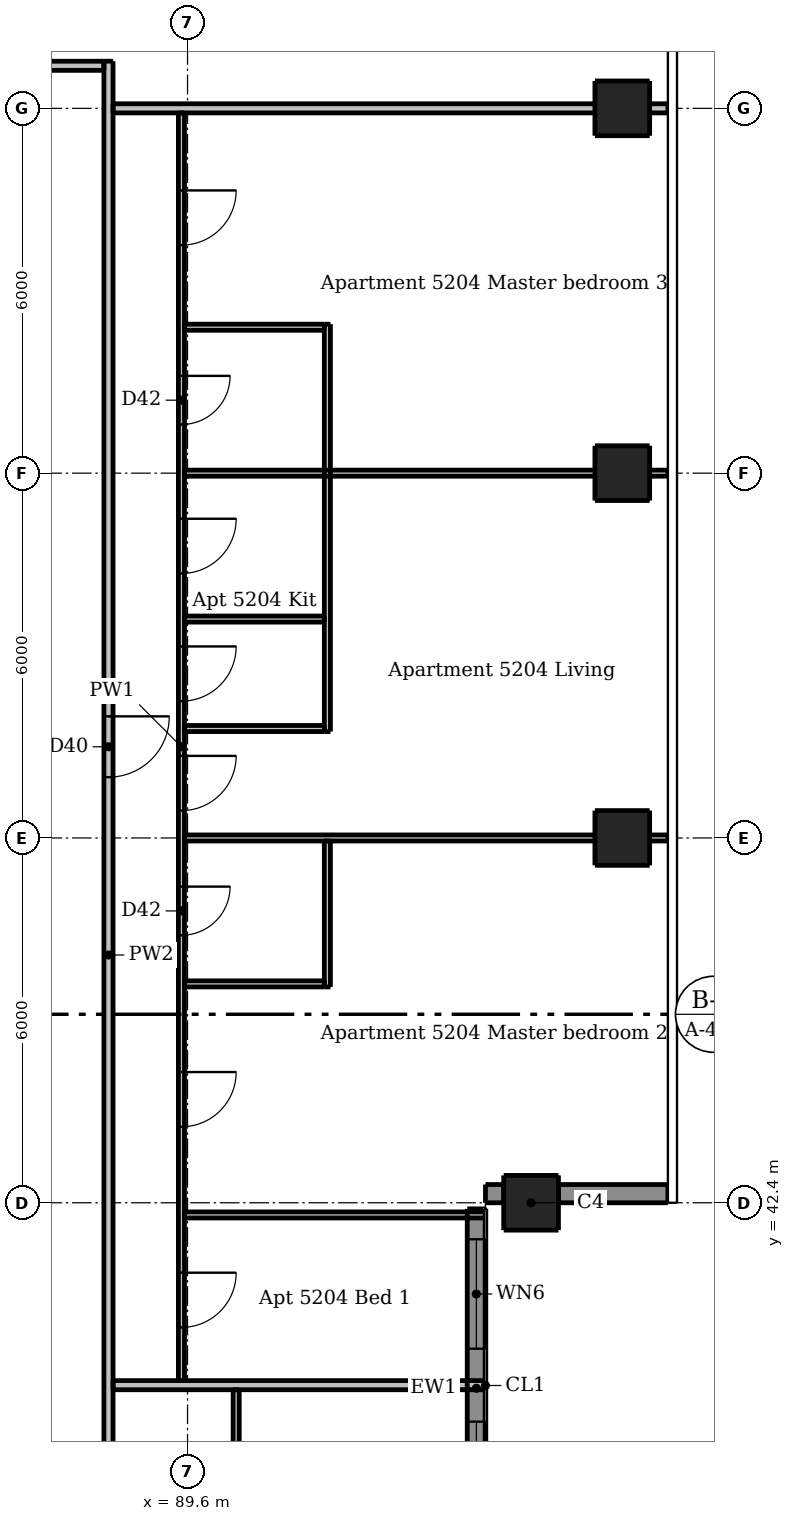
"""IFC4 building model, lengths in metres.
Left out: names, types, materials, properties, quantities, classifications, styles, units other than length and angle.
Written with IfcOpenShell. Run it as: python <this file> out.ifc"""

import sys

from ifc_helpers import new_model, si_unit, direction, frame, frame_2d, origin, origin_2d, place, context, subcontext, project, spatial, rectangle, extrude, element, fill, save


model = new_model("IFC4")
c1 = context("Model", 3, precision=1e-05, world=origin(), true_north=direction((0.0, 1.0)))
c2 = subcontext(c1, "Body", "Model", "MODEL_VIEW")
j1 = project(units=[si_unit("LENGTHUNIT", "METRE"), si_unit("PLANEANGLEUNIT", "RADIAN")], contexts=[c1])
p1 = place(None, origin())
s1 = spatial("IfcSite", under=j1, at=p1, CompositionType="ELEMENT")
p2 = place(p1, origin())
s2 = spatial("IfcBuilding", under=s1, at=p2, CompositionType="ELEMENT")
p3 = place(p2, frame((0.0, 0.0, 196.9)))
s3 = spatial("IfcBuildingStorey", under=s2, at=p3, CompositionType="ELEMENT", Elevation=196.9)
for number, where, z_axis, x_axis in (
    (1, (95.25, 42.4, 0.0), (0.0, 0.0, 1.0), (1.0, 0.0, 0.0)),
    (2, (96.75, 48.4, 0.0), (0.0, 0.0, 1.0), (1.0, 0.0, 0.0)),
    (3, (96.75, 54.4, 0.0), (0.0, 0.0, 1.0), (1.0, 0.0, 0.0)),
    (4, (96.75, 60.4, 0.0), (0.0, 0.0, 1.0), (1.0, 0.0, 0.0)),
):
    element("IfcColumn", number, at=place(p3, frame(where, z_axis=z_axis, x_axis=x_axis)), inside=s3, PredefinedType="COLUMN", context=c2, shape_type="SweptSolid", body=[
        extrude(rectangle(XDim=0.9, YDim=0.9, at=origin_2d()), origin(), (0.0, 0.0, 1.0), 3.05),
    ])
p4 = place(p3, frame((94.5, 42.55, 0.0), z_axis=(0.0, 0.0, 1.0), x_axis=(1.0, 0.0, 0.0)))
e5 = element("IfcWall", 5, at=p4, inside=s3, PredefinedType="SOLIDWALL", context=c2, shape_type="SweptSolid", body=[
    extrude(rectangle(XDim=0.3, YDim=0.3, at=frame_2d((0.15, 0.0))), origin(), (0.0, 0.0, 1.0), 3.05),
])
p5 = place(p3, frame((95.7, 42.55, 0.0), z_axis=(0.0, 0.0, 1.0), x_axis=(1.0, 0.0, 0.0)))
e6 = element("IfcWall", 6, at=p5, inside=s3, PredefinedType="SOLIDWALL", context=c2, shape_type="SweptSolid", body=[
    extrude(rectangle(XDim=1.8, YDim=0.3, at=frame_2d((0.9, 0.0))), origin(), (0.0, 0.0, 1.0), 3.05),
])
p6 = place(p3, frame((94.35, 36.4, 0.0), z_axis=(0.0, 0.0, 1.0), x_axis=(0.0, 1.0, 0.0)))
e7 = element("IfcWall", 7, at=p6, inside=s3, PredefinedType="SOLIDWALL", context=c2, shape_type="SweptSolid", body=[
    extrude(rectangle(XDim=5.9, YDim=0.3, at=frame_2d((2.95, 0.0))), origin(), (0.0, 0.0, 1.0), 3.05),
])
p7 = place(p6, frame((0.6, 0.0, 0.15)))
e8 = element("IfcOpeningElement", 8, at=p7, cuts=e7, PredefinedType="OPENING", context=c2, shape_type="SweptSolid", body=[
    extrude(rectangle(XDim=1.8, YDim=2.1, at=frame_2d((0.9, 1.05))), frame((0.0, 0.16, 0.0), z_axis=(0.0, -1.0, 0.0), x_axis=(1.0, 0.0, 0.0)), (0.0, 0.0, 1.0), 0.32),
])
p8 = place(p6, frame((3.6, 0.0, 0.15)))
e9 = element("IfcOpeningElement", 9, at=p8, cuts=e7, PredefinedType="OPENING", context=c2, shape_type="SweptSolid", body=[
    extrude(rectangle(XDim=1.8, YDim=2.1, at=frame_2d((0.9, 1.05))), frame((0.0, 0.16, 0.0), z_axis=(0.0, -1.0, 0.0), x_axis=(1.0, 0.0, 0.0)), (0.0, 0.0, 1.0), 0.32),
])
p9 = place(p3, frame((89.5, 60.325, 0.0), z_axis=(0.0, 0.0, 1.0), x_axis=(0.0, -1.0, 0.0)))
e10 = element("IfcWall", 10, at=p9, inside=s3, PredefinedType="PARTITIONING", context=c2, shape_type="SweptSolid", body=[
    extrude(rectangle(XDim=20.85, YDim=0.1, at=frame_2d((10.425, 0.0))), origin(), (0.0, 0.0, 1.0), 2.51),
])
p10 = place(p9, frame((10.575, 0.0, 0.0)))
e11 = element("IfcOpeningElement", 11, at=p10, cuts=e10, PredefinedType="OPENING", context=c2, shape_type="SweptSolid", body=[
    extrude(rectangle(XDim=0.9, YDim=2.1, at=frame_2d((0.45, 1.05))), frame((0.0, 0.06, 0.0), z_axis=(0.0, -1.0, 0.0), x_axis=(1.0, 0.0, 0.0)), (0.0, 0.0, 1.0), 0.12),
])
p11 = place(p9, frame((6.675, 0.0, 0.0)))
e12 = element("IfcOpeningElement", 12, at=p11, cuts=e10, PredefinedType="OPENING", context=c2, shape_type="SweptSolid", body=[
    extrude(rectangle(XDim=0.9, YDim=2.1, at=frame_2d((0.45, 1.05))), frame((0.0, 0.06, 0.0), z_axis=(0.0, -1.0, 0.0), x_axis=(1.0, 0.0, 0.0)), (0.0, 0.0, 1.0), 0.12),
])
p12 = place(p9, frame((8.775, 0.0, 0.0)))
e13 = element("IfcOpeningElement", 13, at=p12, cuts=e10, PredefinedType="OPENING", context=c2, shape_type="SweptSolid", body=[
    extrude(rectangle(XDim=0.9, YDim=2.1, at=frame_2d((0.45, 1.05))), frame((0.0, 0.06, 0.0), z_axis=(0.0, -1.0, 0.0), x_axis=(1.0, 0.0, 0.0)), (0.0, 0.0, 1.0), 0.12),
])
p13 = place(p9, frame((19.075, 0.0, 0.0)))
e14 = element("IfcOpeningElement", 14, at=p13, cuts=e10, PredefinedType="OPENING", context=c2, shape_type="SweptSolid", body=[
    extrude(rectangle(XDim=0.9, YDim=2.1, at=frame_2d((0.45, 1.05))), frame((0.0, 0.06, 0.0), z_axis=(0.0, -1.0, 0.0), x_axis=(1.0, 0.0, 0.0)), (0.0, 0.0, 1.0), 0.12),
])
p14 = place(p9, frame((15.775, 0.0, 0.0)))
e15 = element("IfcOpeningElement", 15, at=p14, cuts=e10, PredefinedType="OPENING", context=c2, shape_type="SweptSolid", body=[
    extrude(rectangle(XDim=0.9, YDim=2.1, at=frame_2d((0.45, 1.05))), frame((0.0, 0.06, 0.0), z_axis=(0.0, -1.0, 0.0), x_axis=(1.0, 0.0, 0.0)), (0.0, 0.0, 1.0), 0.12),
])
p15 = place(p9, frame((1.275, 0.0, 0.0)))
e16 = element("IfcOpeningElement", 16, at=p15, cuts=e10, PredefinedType="OPENING", context=c2, shape_type="SweptSolid", body=[
    extrude(rectangle(XDim=0.9, YDim=2.1, at=frame_2d((0.45, 1.05))), frame((0.0, 0.06, 0.0), z_axis=(0.0, -1.0, 0.0), x_axis=(1.0, 0.0, 0.0)), (0.0, 0.0, 1.0), 0.12),
])
p16 = place(p9, frame((12.725, 0.0, 0.0)))
e17 = element("IfcOpeningElement", 17, at=p16, cuts=e10, PredefinedType="OPENING", context=c2, shape_type="SweptSolid", body=[
    extrude(rectangle(XDim=0.8, YDim=2.1, at=frame_2d((0.4, 1.05))), frame((0.0, 0.06, 0.0), z_axis=(0.0, -1.0, 0.0), x_axis=(1.0, 0.0, 0.0)), (0.0, 0.0, 1.0), 0.12),
])
p17 = place(p9, frame((4.325, 0.0, 0.0)))
e18 = element("IfcOpeningElement", 18, at=p17, cuts=e10, PredefinedType="OPENING", context=c2, shape_type="SweptSolid", body=[
    extrude(rectangle(XDim=0.8, YDim=2.1, at=frame_2d((0.4, 1.05))), frame((0.0, 0.06, 0.0), z_axis=(0.0, -1.0, 0.0), x_axis=(1.0, 0.0, 0.0)), (0.0, 0.0, 1.0), 0.12),
])
p18 = place(p3, frame((90.4, 33.45, 0.0), z_axis=(0.0, 0.0, 1.0), x_axis=(0.0, 1.0, 0.0)))
e19 = element("IfcWall", 19, at=p18, inside=s3, PredefinedType="PARTITIONING", context=c2, shape_type="SweptSolid", body=[
    extrude(rectangle(XDim=5.875, YDim=0.1, at=frame_2d((2.938, 0.0))), origin(), (0.0, 0.0, 1.0), 3.05),
])
p19 = place(p18, frame((3.75, 0.0, 0.0)))
e20 = element("IfcOpeningElement", 20, at=p19, cuts=e19, PredefinedType="OPENING", context=c2, shape_type="SweptSolid", body=[
    extrude(rectangle(XDim=0.8, YDim=2.1, at=frame_2d((0.4, 1.05))), frame((0.0, 0.06, 0.0), z_axis=(0.0, -1.0, 0.0), x_axis=(1.0, 0.0, 0.0)), (0.0, 0.0, 1.0), 0.12),
])
p20 = place(p3, frame((91.9, 45.95, 0.0), z_axis=(0.0, 0.0, 1.0), x_axis=(0.0, 1.0, 0.0)))
e21 = element("IfcWall", 21, at=p20, inside=s3, PredefinedType="PARTITIONING", context=c2, shape_type="SweptSolid", body=[
    extrude(rectangle(XDim=2.4, YDim=0.1, at=frame_2d((1.2, 0.0))), origin(), (0.0, 0.0, 1.0), 3.05),
])
p21 = place(p3, frame((91.9, 50.15, 0.0), z_axis=(0.0, 0.0, 1.0), x_axis=(0.0, 1.0, 0.0)))
e22 = element("IfcWall", 22, at=p21, inside=s3, PredefinedType="PARTITIONING", context=c2, shape_type="SweptSolid", body=[
    extrude(rectangle(XDim=6.7, YDim=0.1, at=frame_2d((3.35, 0.0))), origin(), (0.0, 0.0, 1.0), 3.05),
])
p22 = place(p3, frame((89.55, 56.8, 0.0), z_axis=(0.0, 0.0, 1.0), x_axis=(1.0, 0.0, 0.0)))
e23 = element("IfcWall", 23, at=p22, inside=s3, PredefinedType="PARTITIONING", context=c2, shape_type="SweptSolid", body=[
    extrude(rectangle(XDim=2.3, YDim=0.1, at=frame_2d((1.15, 0.0))), origin(), (0.0, 0.0, 1.0), 3.05),
])
p23 = place(p3, frame((89.55, 54.4, 0.0), z_axis=(0.0, 0.0, 1.0), x_axis=(1.0, 0.0, 0.0)))
e24 = element("IfcWall", 24, at=p23, inside=s3, PredefinedType="PARTITIONING", context=c2, shape_type="SweptSolid", body=[
    extrude(rectangle(XDim=7.95, YDim=0.1, at=frame_2d((3.975, 0.0))), origin(), (0.0, 0.0, 1.0), 2.516),
])
for number, where, z_axis, x_axis in (
    (25, (89.55, 52.0, 0.0), (0.0, 0.0, 1.0), (1.0, 0.0, 0.0)),
    (26, (89.55, 50.2, 0.0), (0.0, 0.0, 1.0), (1.0, 0.0, 0.0)),
):
    element("IfcWall", number, at=place(p3, frame(where, z_axis=z_axis, x_axis=x_axis)), inside=s3, PredefinedType="PARTITIONING", context=c2, shape_type="SweptSolid", body=[
        extrude(rectangle(XDim=2.3, YDim=0.1, at=frame_2d((1.15, 0.0))), origin(), (0.0, 0.0, 1.0), 3.05),
    ])
p24 = place(p3, frame((89.55, 48.4, 0.0), z_axis=(0.0, 0.0, 1.0), x_axis=(1.0, 0.0, 0.0)))
e27 = element("IfcWall", 27, at=p24, inside=s3, PredefinedType="PARTITIONING", context=c2, shape_type="SweptSolid", body=[
    extrude(rectangle(XDim=7.95, YDim=0.1, at=frame_2d((3.975, 0.0))), origin(), (0.0, 0.0, 1.0), 2.516),
])
p25 = place(p3, frame((89.55, 46.0, 0.0), z_axis=(0.0, 0.0, 1.0), x_axis=(1.0, 0.0, 0.0)))
e28 = element("IfcWall", 28, at=p25, inside=s3, PredefinedType="PARTITIONING", context=c2, shape_type="SweptSolid", body=[
    extrude(rectangle(XDim=2.3, YDim=0.1, at=frame_2d((1.15, 0.0))), origin(), (0.0, 0.0, 1.0), 3.05),
])
p26 = place(p3, frame((89.55, 42.2, 0.0), z_axis=(0.0, 0.0, 1.0), x_axis=(1.0, 0.0, 0.0)))
e29 = element("IfcWall", 29, at=p26, inside=s3, PredefinedType="PARTITIONING", context=c2, shape_type="SweptSolid", body=[
    extrude(rectangle(XDim=4.95, YDim=0.1, at=frame_2d((2.475, 0.0))), origin(), (0.0, 0.0, 1.0), 3.05),
])
p27 = place(p3, frame((88.3, 61.175, 0.0), z_axis=(0.0, 0.0, 1.0), x_axis=(0.0, -1.0, 0.0)))
e30 = element("IfcWall", 30, at=p27, inside=s3, PredefinedType="PARTITIONING", context=c2, shape_type="SweptSolid", body=[
    extrude(rectangle(XDim=29.4, YDim=0.15, at=frame_2d((14.7, 0.0))), origin(), (0.0, 0.0, 1.0), 3.05),
])
p28 = place(p27, frame((28.125, 0.0, 0.0)))
e31 = element("IfcOpeningElement", 31, at=p28, cuts=e30, PredefinedType="OPENING", context=c2, shape_type="SweptSolid", body=[
    extrude(rectangle(XDim=1.0, YDim=2.1, at=frame_2d((0.5, 1.05))), frame((0.0, 0.085, 0.0), z_axis=(0.0, -1.0, 0.0), x_axis=(1.0, 0.0, 0.0)), (0.0, 0.0, 1.0), 0.17),
])
p29 = place(p27, frame((10.775, 0.0, 0.0)))
e32 = element("IfcOpeningElement", 32, at=p29, cuts=e30, PredefinedType="OPENING", context=c2, shape_type="SweptSolid", body=[
    extrude(rectangle(XDim=1.0, YDim=2.1, at=frame_2d((0.5, 1.05))), frame((0.0, 0.085, 0.0), z_axis=(0.0, -1.0, 0.0), x_axis=(1.0, 0.0, 0.0)), (0.0, 0.0, 1.0), 0.17),
])
p30 = place(p3, frame((58.975, 61.1, 0.0), z_axis=(0.0, 0.0, 1.0), x_axis=(1.0, 0.0, 0.0)))
e33 = element("IfcWall", 33, at=p30, inside=s3, PredefinedType="PARTITIONING", context=c2, shape_type="SweptSolid", body=[
    extrude(rectangle(XDim=29.25, YDim=0.15, at=frame_2d((14.625, 0.0))), origin(), (0.0, 0.0, 1.0), 3.05),
])
p31 = place(p30, frame((7.925, 0.0, 0.0)))
e34 = element("IfcOpeningElement", 34, at=p31, cuts=e33, PredefinedType="OPENING", context=c2, shape_type="SweptSolid", body=[
    extrude(rectangle(XDim=1.0, YDim=2.1, at=frame_2d((0.5, 1.05))), frame((0.0, 0.085, 0.0), z_axis=(0.0, -1.0, 0.0), x_axis=(1.0, 0.0, 0.0)), (0.0, 0.0, 1.0), 0.17),
])
p32 = place(p30, frame((26.475, 0.0, 0.0)))
e35 = element("IfcOpeningElement", 35, at=p32, cuts=e33, PredefinedType="OPENING", context=c2, shape_type="SweptSolid", body=[
    extrude(rectangle(XDim=1.0, YDim=2.1, at=frame_2d((0.5, 1.05))), frame((0.0, 0.085, 0.0), z_axis=(0.0, -1.0, 0.0), x_axis=(1.0, 0.0, 0.0)), (0.0, 0.0, 1.0), 0.17),
])
p33 = place(p3, frame((88.375, 60.4, 0.0), z_axis=(0.0, 0.0, 1.0), x_axis=(1.0, 0.0, 0.0)))
e36 = element("IfcWall", 36, at=p33, inside=s3, PredefinedType="PARTITIONING", context=c2, shape_type="SweptSolid", body=[
    extrude(rectangle(XDim=9.125, YDim=0.15, at=frame_2d((4.562, 0.0))), origin(), (0.0, 0.0, 1.0), 2.59),
])
p34 = place(p3, frame((88.375, 39.4, 0.0), z_axis=(0.0, 0.0, 1.0), x_axis=(1.0, 0.0, 0.0)))
e37 = element("IfcWall", 37, at=p34, inside=s3, PredefinedType="PARTITIONING", context=c2, shape_type="SweptSolid", body=[
    extrude(rectangle(XDim=6.125, YDim=0.15, at=frame_2d((3.062, 0.0))), origin(), (0.0, 0.0, 1.0), 3.05),
])
p35 = place(p7, origin())
e38 = element("IfcWindow", 38, at=p35, inside=s3, PartitioningType="DOUBLE_PANEL_VERTICAL", PredefinedType="WINDOW", context=c2, shape_type="SweptSolid", body=[
    extrude(rectangle(XDim=1.8, YDim=2.1, at=frame_2d((0.9, 1.05))), frame((0.0, 0.03, 0.0), z_axis=(0.0, -1.0, 0.0), x_axis=(1.0, 0.0, 0.0)), (0.0, 0.0, 1.0), 0.06),
])
fill(e8, e38)
p36 = place(p8, origin())
e39 = element("IfcWindow", 39, at=p36, inside=s3, PartitioningType="DOUBLE_PANEL_VERTICAL", PredefinedType="WINDOW", context=c2, shape_type="SweptSolid", body=[
    extrude(rectangle(XDim=1.8, YDim=2.1, at=frame_2d((0.9, 1.05))), frame((0.0, 0.03, 0.0), z_axis=(0.0, -1.0, 0.0), x_axis=(1.0, 0.0, 0.0)), (0.0, 0.0, 1.0), 0.06),
])
fill(e9, e39)
p37 = place(p29, origin())
e40 = element("IfcDoor", 40, at=p37, inside=s3, OperationType="SINGLE_SWING_LEFT", PredefinedType="DOOR", context=c2, shape_type="SweptSolid", body=[
    extrude(rectangle(XDim=1.0, YDim=2.1, at=frame_2d((0.5, 1.05))), frame((0.0, 0.025, 0.0), z_axis=(0.0, -1.0, 0.0), x_axis=(1.0, 0.0, 0.0)), (0.0, 0.0, 1.0), 0.05),
])
fill(e32, e40)
p38 = place(p10, origin())
e41 = element("IfcDoor", 41, at=p38, inside=s3, OperationType="SINGLE_SWING_LEFT", PredefinedType="DOOR", context=c2, shape_type="SweptSolid", body=[
    extrude(rectangle(XDim=0.9, YDim=2.1, at=frame_2d((0.45, 1.05))), frame((0.0, 0.025, 0.0), z_axis=(0.0, -1.0, 0.0), x_axis=(1.0, 0.0, 0.0)), (0.0, 0.0, 1.0), 0.05),
])
fill(e11, e41)
p39 = place(p11, origin())
e42 = element("IfcDoor", 42, at=p39, inside=s3, OperationType="SINGLE_SWING_LEFT", PredefinedType="DOOR", context=c2, shape_type="SweptSolid", body=[
    extrude(rectangle(XDim=0.9, YDim=2.1, at=frame_2d((0.45, 1.05))), frame((0.0, 0.025, 0.0), z_axis=(0.0, -1.0, 0.0), x_axis=(1.0, 0.0, 0.0)), (0.0, 0.0, 1.0), 0.05),
])
fill(e12, e42)
p40 = place(p12, origin())
e43 = element("IfcDoor", 43, at=p40, inside=s3, OperationType="SINGLE_SWING_LEFT", PredefinedType="DOOR", context=c2, shape_type="SweptSolid", body=[
    extrude(rectangle(XDim=0.9, YDim=2.1, at=frame_2d((0.45, 1.05))), frame((0.0, 0.025, 0.0), z_axis=(0.0, -1.0, 0.0), x_axis=(1.0, 0.0, 0.0)), (0.0, 0.0, 1.0), 0.05),
])
fill(e13, e43)
p41 = place(p13, origin())
e44 = element("IfcDoor", 44, at=p41, inside=s3, OperationType="SINGLE_SWING_LEFT", PredefinedType="DOOR", context=c2, shape_type="SweptSolid", body=[
    extrude(rectangle(XDim=0.9, YDim=2.1, at=frame_2d((0.45, 1.05))), frame((0.0, 0.025, 0.0), z_axis=(0.0, -1.0, 0.0), x_axis=(1.0, 0.0, 0.0)), (0.0, 0.0, 1.0), 0.05),
])
fill(e14, e44)
p42 = place(p14, origin())
e45 = element("IfcDoor", 45, at=p42, inside=s3, OperationType="SINGLE_SWING_LEFT", PredefinedType="DOOR", context=c2, shape_type="SweptSolid", body=[
    extrude(rectangle(XDim=0.9, YDim=2.1, at=frame_2d((0.45, 1.05))), frame((0.0, 0.025, 0.0), z_axis=(0.0, -1.0, 0.0), x_axis=(1.0, 0.0, 0.0)), (0.0, 0.0, 1.0), 0.05),
])
fill(e15, e45)
p43 = place(p15, origin())
e46 = element("IfcDoor", 46, at=p43, inside=s3, OperationType="SINGLE_SWING_LEFT", PredefinedType="DOOR", context=c2, shape_type="SweptSolid", body=[
    extrude(rectangle(XDim=0.9, YDim=2.1, at=frame_2d((0.45, 1.05))), frame((0.0, 0.025, 0.0), z_axis=(0.0, -1.0, 0.0), x_axis=(1.0, 0.0, 0.0)), (0.0, 0.0, 1.0), 0.05),
])
fill(e16, e46)
p44 = place(p16, origin())
e47 = element("IfcDoor", 47, at=p44, inside=s3, OperationType="SINGLE_SWING_LEFT", PredefinedType="DOOR", context=c2, shape_type="SweptSolid", body=[
    extrude(rectangle(XDim=0.8, YDim=2.1, at=frame_2d((0.4, 1.05))), frame((0.0, 0.025, 0.0), z_axis=(0.0, -1.0, 0.0), x_axis=(1.0, 0.0, 0.0)), (0.0, 0.0, 1.0), 0.05),
])
fill(e17, e47)
p45 = place(p17, origin())
e48 = element("IfcDoor", 48, at=p45, inside=s3, OperationType="SINGLE_SWING_LEFT", PredefinedType="DOOR", context=c2, shape_type="SweptSolid", body=[
    extrude(rectangle(XDim=0.8, YDim=2.1, at=frame_2d((0.4, 1.05))), frame((0.0, 0.025, 0.0), z_axis=(0.0, -1.0, 0.0), x_axis=(1.0, 0.0, 0.0)), (0.0, 0.0, 1.0), 0.05),
])
fill(e18, e48)
save(model, sys.argv[1])
